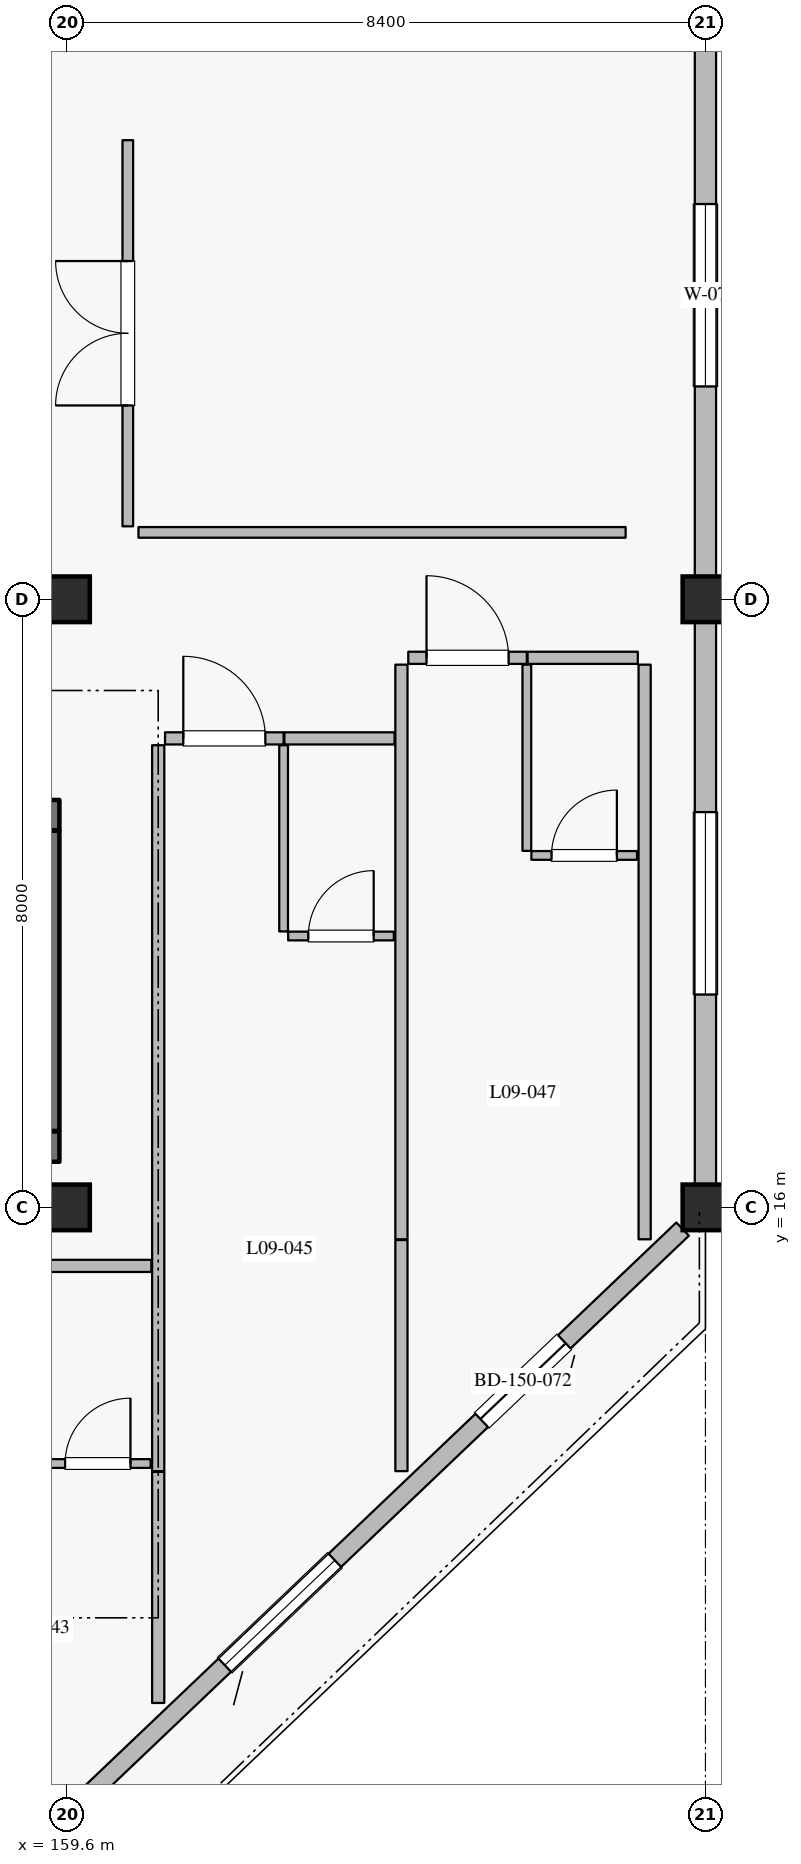
"""IFC4 building model, lengths in metres.
Left out: names, types, materials, properties, quantities, classifications, styles, units other than length and angle.
Written with IfcOpenShell. Run it as: python <this file> out.ifc"""

import sys

from ifc_helpers import new_model, si_unit, direction, frame, frame_2d, origin, origin_2d, place, context, subcontext, project, spatial, rectangle, extrude, element, fill, save


model = new_model("IFC4")
c1 = context("Model", 3, precision=1e-05, world=origin(), true_north=direction((0.0, 1.0)))
c2 = subcontext(c1, "Body", "Model", "MODEL_VIEW")
j1 = project(units=[si_unit("LENGTHUNIT", "METRE"), si_unit("PLANEANGLEUNIT", "RADIAN")], contexts=[c1])
p1 = place(None, origin())
s1 = spatial("IfcSite", under=j1, at=p1, CompositionType="ELEMENT")
p2 = place(p1, origin())
s2 = spatial("IfcBuilding", under=s1, at=p2, CompositionType="ELEMENT")
p3 = place(p2, frame((0.0, 0.0, 39.6)))
s3 = spatial("IfcBuildingStorey", under=s2, at=p3, CompositionType="ELEMENT", Elevation=39.6)
for number, where, z_axis, x_axis in (
    (1, (159.6, 24.0, 0.0), (0.0, 0.0, 1.0), (1.0, 0.0, 0.0)),
    (2, (168.0, 16.0, 0.0), (0.0, 0.0, 1.0), (1.0, 0.0, 0.0)),
    (3, (159.6, 16.0, 0.0), (0.0, 0.0, 1.0), (1.0, 0.0, 0.0)),
    (4, (168.0, 24.0, 0.0), (0.0, 0.0, 1.0), (1.0, 0.0, 0.0)),
):
    element("IfcColumn", number, at=place(p3, frame(where, z_axis=z_axis, x_axis=x_axis)), inside=s3, PredefinedType="COLUMN", context=c2, shape_type="SweptSolid", body=[
        extrude(rectangle(XDim=0.6, YDim=0.6, at=origin_2d()), origin(), (0.0, 0.0, 1.0), 3.6),
    ])
p4 = place(p3, frame((167.7, 15.714, 0.0), z_axis=(0.0, 0.0, 1.0), x_axis=(-0.724156257633, -0.689635928973, 0.0)))
e5 = element("IfcWall", 5, at=p4, inside=s3, PredefinedType="SOLIDWALL", context=c2, shape_type="SweptSolid", body=[
    extrude(rectangle(XDim=10.771, YDim=0.24, at=frame_2d((5.386, 0.0))), origin(), (0.0, 0.0, 1.0), 2.94),
])
p5 = place(p4, frame((2.15, 0.0, 0.0)))
e6 = element("IfcOpeningElement", 6, at=p5, cuts=e5, PredefinedType="OPENING", context=c2, shape_type="SweptSolid", body=[
    extrude(rectangle(XDim=1.5, YDim=2.25, at=frame_2d((0.75, 1.125))), frame((0.0, 0.13, 0.0), z_axis=(0.0, -1.0, 0.0), x_axis=(1.0, 0.0, 0.0)), (0.0, 0.0, 1.0), 0.26),
])
p6 = place(p4, frame((6.319, 0.0, 0.8)))
e7 = element("IfcOpeningElement", 7, at=p6, cuts=e5, PredefinedType="OPENING", context=c2, shape_type="SweptSolid", body=[
    extrude(rectangle(XDim=2.0, YDim=1.75, at=frame_2d((1.0, 0.875))), frame((0.0, 0.13, 0.0), z_axis=(0.0, -1.0, 0.0), x_axis=(1.0, 0.0, 0.0)), (0.0, 0.0, 1.0), 0.26),
])
p7 = place(p3, frame((168.0, 31.7, 0.0), z_axis=(0.0, 0.0, 1.0), x_axis=(0.0, -1.0, 0.0)))
e8 = element("IfcWall", 8, at=p7, inside=s3, PredefinedType="SOLIDWALL", context=c2, shape_type="SweptSolid", body=[
    extrude(rectangle(XDim=7.4, YDim=0.28, at=frame_2d((3.7, 0.0))), origin(), (0.0, 0.0, 1.0), 2.7),
])
p8 = place(p7, frame((2.5, 0.0, 0.5)))
e9 = element("IfcOpeningElement", 9, at=p8, cuts=e8, PredefinedType="OPENING", context=c2, shape_type="SweptSolid", body=[
    extrude(rectangle(XDim=2.4, YDim=1.65, at=frame_2d((1.2, 0.825))), frame((0.0, 0.15, 0.0), z_axis=(0.0, -1.0, 0.0), x_axis=(1.0, 0.0, 0.0)), (0.0, 0.0, 1.0), 0.3),
])
p9 = place(p3, frame((168.0, 23.7, 0.0), z_axis=(0.0, 0.0, 1.0), x_axis=(0.0, -1.0, 0.0)))
e10 = element("IfcWall", 10, at=p9, inside=s3, PredefinedType="SOLIDWALL", context=c2, shape_type="SweptSolid", body=[
    extrude(rectangle(XDim=7.4, YDim=0.28, at=frame_2d((3.7, 0.0))), origin(), (0.0, 0.0, 1.0), 2.7),
])
p10 = place(p9, frame((2.5, 0.0, 0.5)))
e11 = element("IfcOpeningElement", 11, at=p10, cuts=e10, PredefinedType="OPENING", context=c2, shape_type="SweptSolid", body=[
    extrude(rectangle(XDim=2.4, YDim=1.65, at=frame_2d((1.2, 0.825))), frame((0.0, 0.15, 0.0), z_axis=(0.0, -1.0, 0.0), x_axis=(1.0, 0.0, 0.0)), (0.0, 0.0, 1.0), 0.3),
])
p11 = place(p3, frame((151.3, 16.8, 0.0), z_axis=(0.0, 0.0, 1.0), x_axis=(1.0, 0.0, 0.0)))
e12 = element("IfcWall", 12, at=p11, inside=s3, PredefinedType="SHEAR", context=c2, shape_type="SweptSolid", body=[
    extrude(rectangle(XDim=8.2, YDim=0.4, at=frame_2d((4.1, 0.0))), origin(), (0.0, 0.0, 1.0), 3.335),
])
p12 = place(p3, frame((159.3, 17.005, 0.0), z_axis=(0.0, 0.0, 1.0), x_axis=(0.0, 1.0, 0.0)))
e13 = element("IfcWall", 13, at=p12, inside=s3, PredefinedType="SHEAR", context=c2, shape_type="SweptSolid", body=[
    extrude(rectangle(XDim=3.95, YDim=0.4, at=frame_2d((1.975, 0.0))), origin(), (0.0, 0.0, 1.0), 3.335),
])
p13 = place(p3, frame((151.3, 21.16, 0.0), z_axis=(0.0, 0.0, 1.0), x_axis=(1.0, 0.0, 0.0)))
e14 = element("IfcWall", 14, at=p13, inside=s3, PredefinedType="SHEAR", context=c2, shape_type="SweptSolid", body=[
    extrude(rectangle(XDim=8.2, YDim=0.4, at=frame_2d((4.1, 0.0))), origin(), (0.0, 0.0, 1.0), 3.335),
])
p14 = place(p13, frame((0.43, 0.0, 0.0)))
e15 = element("IfcOpeningElement", 15, at=p14, cuts=e14, PredefinedType="OPENING", context=c2, shape_type="SweptSolid", body=[
    extrude(rectangle(XDim=1.16, YDim=2.2, at=frame_2d((0.58, 1.1))), frame((0.0, 0.21, 0.0), z_axis=(0.0, -1.0, 0.0), x_axis=(1.0, 0.0, 0.0)), (0.0, 0.0, 1.0), 0.42),
])
p15 = place(p3, frame((159.26, 15.23, 0.0), z_axis=(0.0, 0.0, 1.0), x_axis=(1.0, 0.0, 0.0)))
e16 = element("IfcWall", 16, at=p15, inside=s3, PredefinedType="PARTITIONING", context=c2, shape_type="SweptSolid", body=[
    extrude(rectangle(XDim=1.45, YDim=0.16, at=frame_2d((0.725, 0.0))), origin(), (0.0, 0.0, 1.0), 3.335),
])
p16 = place(p3, frame((159.31, 12.63, 0.0), z_axis=(0.0, 0.0, 1.0), x_axis=(1.0, 0.0, 0.0)))
e17 = element("IfcWall", 17, at=p16, inside=s3, PredefinedType="PARTITIONING", context=c2, shape_type="SweptSolid", body=[
    extrude(rectangle(XDim=1.39, YDim=0.115, at=frame_2d((0.695, 0.0))), origin(), (0.0, 0.0, 1.0), 3.335),
])
p17 = place(p16, frame((0.265, 0.0, 0.0)))
e18 = element("IfcOpeningElement", 18, at=p17, cuts=e17, PredefinedType="OPENING", context=c2, shape_type="SweptSolid", body=[
    extrude(rectangle(XDim=0.86, YDim=2.12, at=frame_2d((0.43, 1.06))), frame((0.0, 0.067, 0.0), z_axis=(0.0, -1.0, 0.0), x_axis=(1.0, 0.0, 0.0)), (0.0, 0.0, 1.0), 0.135),
])
p18 = place(p3, frame((160.8, 9.48, 0.0), z_axis=(0.0, 0.0, 1.0), x_axis=(0.0, 1.0, 0.0)))
e19 = element("IfcWall", 19, at=p18, inside=s3, PredefinedType="PARTITIONING", context=c2, shape_type="SweptSolid", body=[
    extrude(rectangle(XDim=3.04, YDim=0.16, at=frame_2d((1.52, 0.0))), origin(), (0.0, 0.0, 1.0), 3.335),
])
p19 = place(p3, frame((160.89, 22.17, 0.0), z_axis=(0.0, 0.0, 1.0), x_axis=(1.0, 0.0, 0.0)))
e20 = element("IfcWall", 20, at=p19, inside=s3, PredefinedType="PARTITIONING", context=c2, shape_type="SweptSolid", body=[
    extrude(rectangle(XDim=1.56, YDim=0.16, at=frame_2d((0.78, 0.0))), origin(), (0.0, 0.0, 1.0), 3.335),
])
p20 = place(p19, frame((0.24, 0.0, 0.0)))
e21 = element("IfcOpeningElement", 21, at=p20, cuts=e20, PredefinedType="OPENING", context=c2, shape_type="SweptSolid", body=[
    extrude(rectangle(XDim=1.08, YDim=2.3, at=frame_2d((0.54, 1.15))), frame((0.0, 0.09, 0.0), z_axis=(0.0, -1.0, 0.0), x_axis=(1.0, 0.0, 0.0)), (0.0, 0.0, 1.0), 0.18),
])
p21 = place(p3, frame((162.46, 22.17, 0.0), z_axis=(0.0, 0.0, 1.0), x_axis=(1.0, 0.0, 0.0)))
e22 = element("IfcWall", 22, at=p21, inside=s3, PredefinedType="PARTITIONING", context=c2, shape_type="SweptSolid", body=[
    extrude(rectangle(XDim=1.45, YDim=0.16, at=frame_2d((0.725, 0.0))), origin(), (0.0, 0.0, 1.0), 3.335),
])
p22 = place(p3, frame((162.45, 19.63, 0.0), z_axis=(0.0, 0.0, 1.0), x_axis=(0.0, 1.0, 0.0)))
e23 = element("IfcWall", 23, at=p22, inside=s3, PredefinedType="PARTITIONING", context=c2, shape_type="SweptSolid", body=[
    extrude(rectangle(XDim=2.45, YDim=0.115, at=frame_2d((1.225, 0.0))), origin(), (0.0, 0.0, 1.0), 3.335),
])
p23 = place(p3, frame((162.51, 19.57, 0.0), z_axis=(0.0, 0.0, 1.0), x_axis=(1.0, 0.0, 0.0)))
e24 = element("IfcWall", 24, at=p23, inside=s3, PredefinedType="PARTITIONING", context=c2, shape_type="SweptSolid", body=[
    extrude(rectangle(XDim=1.39, YDim=0.115, at=frame_2d((0.695, 0.0))), origin(), (0.0, 0.0, 1.0), 3.335),
])
p24 = place(p23, frame((0.265, 0.0, 0.0)))
e25 = element("IfcOpeningElement", 25, at=p24, cuts=e24, PredefinedType="OPENING", context=c2, shape_type="SweptSolid", body=[
    extrude(rectangle(XDim=0.86, YDim=2.12, at=frame_2d((0.43, 1.06))), frame((0.0, 0.067, 0.0), z_axis=(0.0, -1.0, 0.0), x_axis=(1.0, 0.0, 0.0)), (0.0, 0.0, 1.0), 0.135),
])
p25 = place(p3, frame((160.8, 12.53, 0.0), z_axis=(0.0, 0.0, 1.0), x_axis=(0.0, 1.0, 0.0)))
e26 = element("IfcWall", 26, at=p25, inside=s3, PredefinedType="PARTITIONING", context=c2, shape_type="SweptSolid", body=[
    extrude(rectangle(XDim=9.55, YDim=0.16, at=frame_2d((4.775, 0.0))), origin(), (0.0, 0.0, 1.0), 3.335),
])
p26 = place(p3, frame((164.0, 12.53, 0.0), z_axis=(0.0, 0.0, 1.0), x_axis=(0.0, 1.0, 0.0)))
e27 = element("IfcWall", 27, at=p26, inside=s3, PredefinedType="PARTITIONING", context=c2, shape_type="SweptSolid", body=[
    extrude(rectangle(XDim=3.04, YDim=0.16, at=frame_2d((1.52, 0.0))), origin(), (0.0, 0.0, 1.0), 3.335),
])
p27 = place(p3, frame((164.09, 23.23, 0.0), z_axis=(0.0, 0.0, 1.0), x_axis=(1.0, 0.0, 0.0)))
e28 = element("IfcWall", 28, at=p27, inside=s3, PredefinedType="PARTITIONING", context=c2, shape_type="SweptSolid", body=[
    extrude(rectangle(XDim=1.56, YDim=0.16, at=frame_2d((0.78, 0.0))), origin(), (0.0, 0.0, 1.0), 3.335),
])
p28 = place(p27, frame((0.24, 0.0, 0.0)))
e29 = element("IfcOpeningElement", 29, at=p28, cuts=e28, PredefinedType="OPENING", context=c2, shape_type="SweptSolid", body=[
    extrude(rectangle(XDim=1.08, YDim=2.3, at=frame_2d((0.54, 1.15))), frame((0.0, 0.09, 0.0), z_axis=(0.0, -1.0, 0.0), x_axis=(1.0, 0.0, 0.0)), (0.0, 0.0, 1.0), 0.18),
])
p29 = place(p3, frame((165.66, 23.23, 0.0), z_axis=(0.0, 0.0, 1.0), x_axis=(1.0, 0.0, 0.0)))
e30 = element("IfcWall", 30, at=p29, inside=s3, PredefinedType="PARTITIONING", context=c2, shape_type="SweptSolid", body=[
    extrude(rectangle(XDim=1.45, YDim=0.16, at=frame_2d((0.725, 0.0))), origin(), (0.0, 0.0, 1.0), 3.335),
])
p30 = place(p3, frame((165.65, 20.69, 0.0), z_axis=(0.0, 0.0, 1.0), x_axis=(0.0, 1.0, 0.0)))
e31 = element("IfcWall", 31, at=p30, inside=s3, PredefinedType="PARTITIONING", context=c2, shape_type="SweptSolid", body=[
    extrude(rectangle(XDim=2.45, YDim=0.115, at=frame_2d((1.225, 0.0))), origin(), (0.0, 0.0, 1.0), 3.335),
])
p31 = place(p3, frame((165.71, 20.63, 0.0), z_axis=(0.0, 0.0, 1.0), x_axis=(1.0, 0.0, 0.0)))
e32 = element("IfcWall", 32, at=p31, inside=s3, PredefinedType="PARTITIONING", context=c2, shape_type="SweptSolid", body=[
    extrude(rectangle(XDim=1.39, YDim=0.115, at=frame_2d((0.695, 0.0))), origin(), (0.0, 0.0, 1.0), 3.335),
])
p32 = place(p31, frame((0.265, 0.0, 0.0)))
e33 = element("IfcOpeningElement", 33, at=p32, cuts=e32, PredefinedType="OPENING", context=c2, shape_type="SweptSolid", body=[
    extrude(rectangle(XDim=0.86, YDim=2.12, at=frame_2d((0.43, 1.06))), frame((0.0, 0.067, 0.0), z_axis=(0.0, -1.0, 0.0), x_axis=(1.0, 0.0, 0.0)), (0.0, 0.0, 1.0), 0.135),
])
for number, where, z_axis, x_axis in (
    (34, (164.0, 15.58, 0.0), (0.0, 0.0, 1.0), (0.0, 1.0, 0.0)),
    (35, (167.2, 15.58, 0.0), (0.0, 0.0, 1.0), (0.0, 1.0, 0.0)),
):
    element("IfcWall", number, at=place(p3, frame(where, z_axis=z_axis, x_axis=x_axis)), inside=s3, PredefinedType="PARTITIONING", context=c2, shape_type="SweptSolid", body=[
        extrude(rectangle(XDim=7.56, YDim=0.16, at=frame_2d((3.78, 0.0))), origin(), (0.0, 0.0, 1.0), 3.335),
    ])
p33 = place(p3, frame((160.4, 24.96, 0.0), z_axis=(0.0, 0.0, 1.0), x_axis=(0.0, 1.0, 0.0)))
e36 = element("IfcWall", 36, at=p33, inside=s3, PredefinedType="PARTITIONING", context=c2, shape_type="SweptSolid", body=[
    extrude(rectangle(XDim=5.08, YDim=0.14, at=frame_2d((2.54, 0.0))), origin(), (0.0, 0.0, 1.0), 3.335),
])
p34 = place(p33, frame((1.59, 0.0, 0.0)))
e37 = element("IfcOpeningElement", 37, at=p34, cuts=e36, PredefinedType="OPENING", context=c2, shape_type="SweptSolid", body=[
    extrude(rectangle(XDim=1.9, YDim=2.4, at=frame_2d((0.95, 1.2))), frame((0.0, 0.08, 0.0), z_axis=(0.0, -1.0, 0.0), x_axis=(1.0, 0.0, 0.0)), (0.0, 0.0, 1.0), 0.16),
])
p35 = place(p3, frame((160.54, 24.88, 0.0), z_axis=(0.0, 0.0, 1.0), x_axis=(1.0, 0.0, 0.0)))
e38 = element("IfcWall", 38, at=p35, inside=s3, PredefinedType="PARTITIONING", context=c2, shape_type="SweptSolid", body=[
    extrude(rectangle(XDim=6.41, YDim=0.14, at=frame_2d((3.205, 0.0))), origin(), (0.0, 0.0, 1.0), 3.335),
])
p36 = place(p5, origin())
e39 = element("IfcDoor", 39, at=p36, inside=s3, OperationType="SLIDING_TO_LEFT", PredefinedType="DOOR", context=c2, shape_type="SweptSolid", body=[
    extrude(rectangle(XDim=1.5, YDim=2.25, at=frame_2d((0.75, 1.125))), frame((0.0, 0.025, 0.0), z_axis=(0.0, -1.0, 0.0), x_axis=(1.0, 0.0, 0.0)), (0.0, 0.0, 1.0), 0.05),
])
fill(e6, e39)
p37 = place(p6, origin())
e40 = element("IfcWindow", 40, at=p37, inside=s3, PartitioningType="DOUBLE_PANEL_VERTICAL", PredefinedType="WINDOW", context=c2, shape_type="SweptSolid", body=[
    extrude(rectangle(XDim=2.0, YDim=1.75, at=frame_2d((1.0, 0.875))), frame((0.0, 0.03, 0.0), z_axis=(0.0, -1.0, 0.0), x_axis=(1.0, 0.0, 0.0)), (0.0, 0.0, 1.0), 0.06),
])
fill(e7, e40)
p38 = place(p8, origin())
e41 = element("IfcWindow", 41, at=p38, inside=s3, PartitioningType="DOUBLE_PANEL_VERTICAL", PredefinedType="WINDOW", context=c2, shape_type="SweptSolid", body=[
    extrude(rectangle(XDim=2.4, YDim=1.65, at=frame_2d((1.2, 0.825))), frame((0.0, 0.03, 0.0), z_axis=(0.0, -1.0, 0.0), x_axis=(1.0, 0.0, 0.0)), (0.0, 0.0, 1.0), 0.06),
])
fill(e9, e41)
p39 = place(p10, origin())
e42 = element("IfcWindow", 42, at=p39, inside=s3, PartitioningType="DOUBLE_PANEL_VERTICAL", PredefinedType="WINDOW", context=c2, shape_type="SweptSolid", body=[
    extrude(rectangle(XDim=2.4, YDim=1.65, at=frame_2d((1.2, 0.825))), frame((0.0, 0.03, 0.0), z_axis=(0.0, -1.0, 0.0), x_axis=(1.0, 0.0, 0.0)), (0.0, 0.0, 1.0), 0.06),
])
fill(e11, e42)
p40 = place(p17, origin())
e43 = element("IfcDoor", 43, at=p40, inside=s3, OperationType="SINGLE_SWING_RIGHT", PredefinedType="DOOR", context=c2, shape_type="SweptSolid", body=[
    extrude(rectangle(XDim=0.86, YDim=2.12, at=frame_2d((0.43, 1.06))), frame((0.0, 0.025, 0.0), z_axis=(0.0, -1.0, 0.0), x_axis=(1.0, 0.0, 0.0)), (0.0, 0.0, 1.0), 0.05),
])
fill(e18, e43)
p41 = place(p20, origin())
e44 = element("IfcDoor", 44, at=p41, inside=s3, OperationType="SINGLE_SWING_LEFT", PredefinedType="DOOR", context=c2, shape_type="SweptSolid", body=[
    extrude(rectangle(XDim=1.08, YDim=2.3, at=frame_2d((0.54, 1.15))), frame((0.0, 0.025, 0.0), z_axis=(0.0, -1.0, 0.0), x_axis=(1.0, 0.0, 0.0)), (0.0, 0.0, 1.0), 0.05),
])
fill(e21, e44)
p42 = place(p24, origin())
e45 = element("IfcDoor", 45, at=p42, inside=s3, OperationType="SINGLE_SWING_RIGHT", PredefinedType="DOOR", context=c2, shape_type="SweptSolid", body=[
    extrude(rectangle(XDim=0.86, YDim=2.12, at=frame_2d((0.43, 1.06))), frame((0.0, 0.025, 0.0), z_axis=(0.0, -1.0, 0.0), x_axis=(1.0, 0.0, 0.0)), (0.0, 0.0, 1.0), 0.05),
])
fill(e25, e45)
p43 = place(p28, origin())
e46 = element("IfcDoor", 46, at=p43, inside=s3, OperationType="SINGLE_SWING_LEFT", PredefinedType="DOOR", context=c2, shape_type="SweptSolid", body=[
    extrude(rectangle(XDim=1.08, YDim=2.3, at=frame_2d((0.54, 1.15))), frame((0.0, 0.025, 0.0), z_axis=(0.0, -1.0, 0.0), x_axis=(1.0, 0.0, 0.0)), (0.0, 0.0, 1.0), 0.05),
])
fill(e29, e46)
p44 = place(p32, origin())
e47 = element("IfcDoor", 47, at=p44, inside=s3, OperationType="SINGLE_SWING_RIGHT", PredefinedType="DOOR", context=c2, shape_type="SweptSolid", body=[
    extrude(rectangle(XDim=0.86, YDim=2.12, at=frame_2d((0.43, 1.06))), frame((0.0, 0.025, 0.0), z_axis=(0.0, -1.0, 0.0), x_axis=(1.0, 0.0, 0.0)), (0.0, 0.0, 1.0), 0.05),
])
fill(e33, e47)
p45 = place(p34, origin())
e48 = element("IfcDoor", 48, at=p45, inside=s3, OperationType="DOUBLE_DOOR_SINGLE_SWING", PredefinedType="DOOR", context=c2, shape_type="SweptSolid", body=[
    extrude(rectangle(XDim=1.9, YDim=2.4, at=frame_2d((0.95, 1.2))), frame((0.0, 0.025, 0.0), z_axis=(0.0, -1.0, 0.0), x_axis=(1.0, 0.0, 0.0)), (0.0, 0.0, 1.0), 0.05),
])
fill(e37, e48)
save(model, sys.argv[1])
